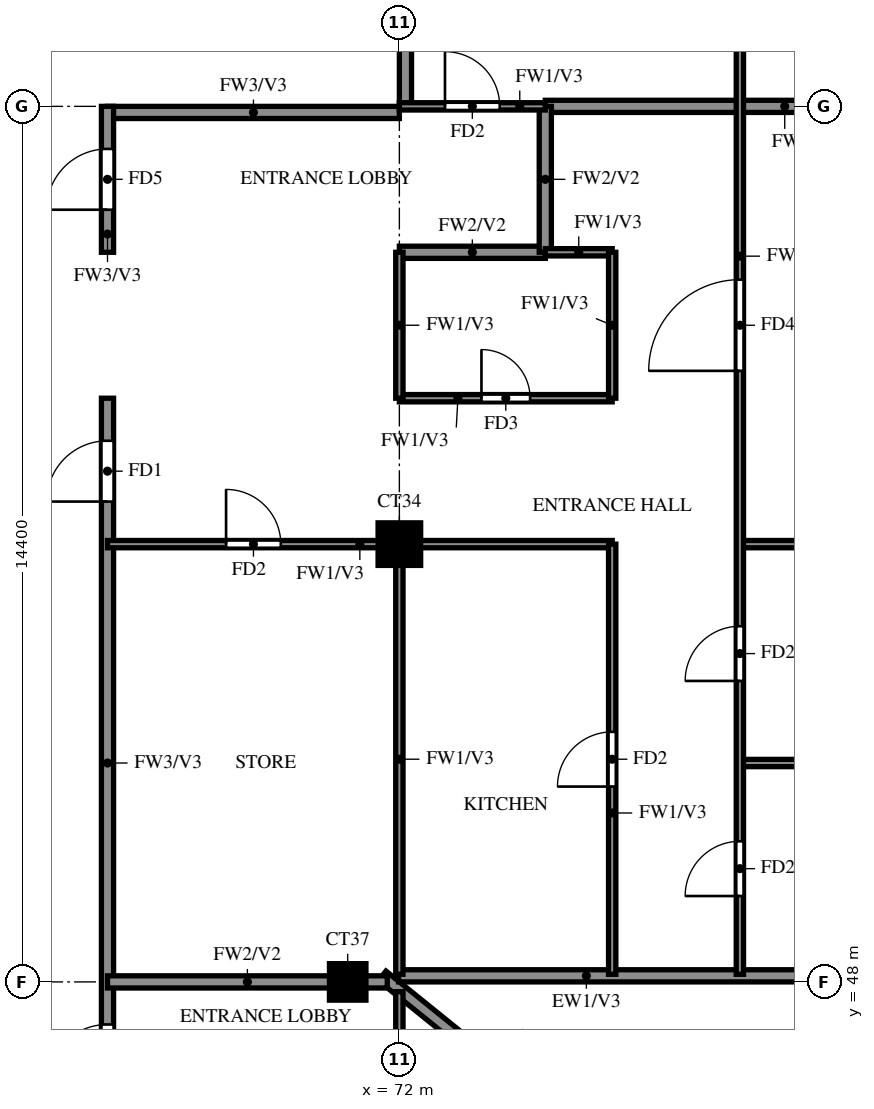
"""IFC4 building model, lengths in metres.
Left out: names, types, materials, properties, quantities, classifications, styles, units other than length and angle.
Written with IfcOpenShell. Run it as: python <this file> out.ifc"""

import sys

from ifc_helpers import new_model, si_unit, direction, frame, frame_2d, origin, origin_2d, place, context, subcontext, project, spatial, rectangle, extrude, source, transform, mapped, element, fill, save


model = new_model("IFC4")
c1 = context("Model", 3, precision=1e-05, world=origin(), true_north=direction((0.0, 1.0)))
c2 = subcontext(c1, "Body", "Model", "MODEL_VIEW")
j1 = project(units=[si_unit("LENGTHUNIT", "METRE"), si_unit("PLANEANGLEUNIT", "RADIAN")], contexts=[c1])
p1 = place(None, origin())
s1 = spatial("IfcSite", under=j1, at=p1, CompositionType="ELEMENT")
p2 = place(p1, origin())
s2 = spatial("IfcBuilding", under=s1, at=p2, CompositionType="ELEMENT")
p3 = place(p2, frame((0.0, 0.0, 257.0)))
s3 = spatial("IfcBuildingStorey", under=s2, at=p3, CompositionType="ELEMENT", Elevation=257.0)
m1 = source(origin(), c2, "Body", "SweptSolid", [
    extrude(rectangle(XDim=0.6, YDim=0.6, at=origin_2d()), origin(), (0.0, 0.0, 1.0), 3.22),
])
p4 = place(p3, frame((71.15, 48.0, 0.0), z_axis=(0.0, 0.0, 1.0), x_axis=(1.0, 0.0, 0.0)))
e1 = element("IfcColumn", 1, at=p4, inside=s3, PredefinedType="COLUMN", context=c2, shape_type="MappedRepresentation", body=[
    mapped(m1, transform((0.0, 0.0, 0.0))),
])
m2 = source(origin(), c2, "Body", "SweptSolid", [
    extrude(rectangle(XDim=0.7, YDim=0.7, at=origin_2d()), origin(), (0.0, 0.0, 1.0), 3.22),
])
p5 = place(p3, frame((72.0, 55.2, 0.0), z_axis=(0.0, 0.0, 1.0), x_axis=(1.0, 0.0, 0.0)))
e2 = element("IfcColumn", 2, at=p5, inside=s3, PredefinedType="COLUMN", context=c2, shape_type="MappedRepresentation", body=[
    mapped(m2, transform((0.0, 0.0, 0.0))),
])
p6 = place(p3, frame((81.907, 39.87, 0.0), z_axis=(0.0, 0.0, 1.0), x_axis=(-0.777936274417, 0.62834318087, 0.0)))
e3 = element("IfcWall", 3, at=p6, inside=s3, PredefinedType="SOLIDWALL", context=c2, shape_type="SweptSolid", body=[
    extrude(rectangle(XDim=13.099, YDim=0.2, at=frame_2d((6.549, 0.0))), origin(), (0.0, 0.0, 1.0), 3.22),
])
p7 = place(p6, frame((9.938, 0.0, 1.5)))
e4 = element("IfcOpeningElement", 4, at=p7, cuts=e3, PredefinedType="OPENING", context=c2, shape_type="SweptSolid", body=[
    extrude(rectangle(XDim=0.9, YDim=0.9, at=frame_2d((0.45, 0.45))), frame((0.0, 0.11, 0.0), z_axis=(0.0, -1.0, 0.0), x_axis=(1.0, 0.0, 0.0)), (0.0, 0.0, 1.0), 0.22),
])
p8 = place(p3, frame((71.987, 48.1, 0.0), z_axis=(0.0, 0.0, 1.0), x_axis=(1.0, 0.0, 0.0)))
e5 = element("IfcWall", 5, at=p8, inside=s3, PredefinedType="SOLIDWALL", context=c2, shape_type="SweptSolid", body=[
    extrude(rectangle(XDim=6.863, YDim=0.2, at=frame_2d((3.432, 0.0))), origin(), (0.0, 0.0, 1.0), 3.22),
])
p9 = place(p3, frame((67.2, 62.3, 0.0), z_axis=(0.0, 0.0, 1.0), x_axis=(1.0, 0.0, 0.0)))
e6 = element("IfcWall", 6, at=p9, inside=s3, PredefinedType="SOLIDWALL", context=c2, shape_type="SweptSolid", body=[
    extrude(rectangle(XDim=4.8, YDim=0.2, at=frame_2d((2.4, 0.0))), origin(), (0.0, 0.0, 1.0), 3.22),
])
p10 = place(p3, frame((67.2, 45.6, 0.0), z_axis=(0.0, 0.0, 1.0), x_axis=(0.0, 1.0, 0.0)))
e7 = element("IfcWall", 7, at=p10, inside=s3, PredefinedType="SOLIDWALL", context=c2, shape_type="SweptSolid", body=[
    extrude(rectangle(XDim=12.0, YDim=0.2, at=frame_2d((6.0, 0.0))), origin(), (0.0, 0.0, 1.0), 3.22),
])
p11 = place(p10, frame((10.3, 0.0, 0.0)))
e8 = element("IfcOpeningElement", 8, at=p11, cuts=e7, PredefinedType="OPENING", context=c2, shape_type="SweptSolid", body=[
    extrude(rectangle(XDim=1.0, YDim=2.1, at=frame_2d((0.5, 1.05))), frame((0.0, 0.11, 0.0), z_axis=(0.0, -1.0, 0.0), x_axis=(1.0, 0.0, 0.0)), (0.0, 0.0, 1.0), 0.22),
])
p12 = place(p10, frame((0.7, 0.0, 0.0)))
e9 = element("IfcOpeningElement", 9, at=p12, cuts=e7, PredefinedType="OPENING", context=c2, shape_type="SweptSolid", body=[
    extrude(rectangle(XDim=1.0, YDim=2.1, at=frame_2d((0.5, 1.05))), frame((0.0, 0.11, 0.0), z_axis=(0.0, -1.0, 0.0), x_axis=(1.0, 0.0, 0.0)), (0.0, 0.0, 1.0), 0.22),
])
p13 = place(p3, frame((67.2, 60.0, 0.0), z_axis=(0.0, 0.0, 1.0), x_axis=(0.0, 1.0, 0.0)))
e10 = element("IfcWall", 10, at=p13, inside=s3, PredefinedType="SOLIDWALL", context=c2, shape_type="SweptSolid", body=[
    extrude(rectangle(XDim=2.4, YDim=0.2, at=frame_2d((1.2, 0.0))), origin(), (0.0, 0.0, 1.0), 3.22),
])
p14 = place(p13, frame((0.7, 0.0, 0.0)))
e11 = element("IfcOpeningElement", 11, at=p14, cuts=e10, PredefinedType="OPENING", context=c2, shape_type="SweptSolid", body=[
    extrude(rectangle(XDim=1.0, YDim=2.1, at=frame_2d((0.5, 1.05))), frame((0.0, 0.11, 0.0), z_axis=(0.0, -1.0, 0.0), x_axis=(1.0, 0.0, 0.0)), (0.0, 0.0, 1.0), 0.22),
])
p15 = place(p3, frame((72.1, 62.4, 0.0), z_axis=(0.0, 0.0, 1.0), x_axis=(0.0, 1.0, 0.0)))
e12 = element("IfcWall", 12, at=p15, inside=s3, PredefinedType="SOLIDWALL", context=c2, shape_type="SweptSolid", body=[
    extrude(rectangle(XDim=15.6, YDim=0.2, at=frame_2d((7.8, 0.0))), origin(), (0.0, 0.0, 1.0), 3.22),
])
p16 = place(p3, frame((67.2, 48.0, 0.0), z_axis=(0.0, 0.0, 1.0), x_axis=(1.0, 0.0, 0.0)))
e13 = element("IfcWall", 13, at=p16, inside=s3, PredefinedType="SOLIDWALL", context=c2, shape_type="SweptSolid", body=[
    extrude(rectangle(XDim=4.601, YDim=0.2, at=frame_2d((2.301, 0.0))), origin(), (0.0, 0.0, 1.0), 3.22),
])
p17 = place(p3, frame((72.0, 60.0, 0.0), z_axis=(0.0, 0.0, 1.0), x_axis=(1.0, 0.0, 0.0)))
e14 = element("IfcWall", 14, at=p17, inside=s3, PredefinedType="SOLIDWALL", context=c2, shape_type="SweptSolid", body=[
    extrude(rectangle(XDim=2.4, YDim=0.2, at=frame_2d((1.2, 0.0))), origin(), (0.0, 0.0, 1.0), 3.22),
])
p18 = place(p3, frame((74.4, 62.4, 0.0), z_axis=(0.0, 0.0, 1.0), x_axis=(1.0, 0.0, 0.0)))
e15 = element("IfcWall", 15, at=p18, inside=s3, PredefinedType="SOLIDWALL", context=c2, shape_type="SweptSolid", body=[
    extrude(rectangle(XDim=7.875, YDim=0.2, at=frame_2d((3.938, 0.0))), origin(), (0.0, 0.0, 1.0), 3.22),
])
p19 = place(p3, frame((74.4, 60.0, 0.0), z_axis=(0.0, 0.0, 1.0), x_axis=(0.0, 1.0, 0.0)))
e16 = element("IfcWall", 16, at=p19, inside=s3, PredefinedType="SOLIDWALL", context=c2, shape_type="SweptSolid", body=[
    extrude(rectangle(XDim=2.4, YDim=0.2, at=frame_2d((1.2, 0.0))), origin(), (0.0, 0.0, 1.0), 3.22),
])
p20 = place(p3, frame((77.6, 51.6, 0.0), z_axis=(0.0, 0.0, 1.0), x_axis=(1.0, 0.0, 0.0)))
e17 = element("IfcWall", 17, at=p20, inside=s3, PredefinedType="PARTITIONING", context=c2, shape_type="SweptSolid", body=[
    extrude(rectangle(XDim=4.675, YDim=0.12, at=frame_2d((2.337, 0.0))), origin(), (0.0, 0.0, 1.0), 2.32),
])
p21 = place(p3, frame((67.2, 55.2, 0.0), z_axis=(0.0, 0.0, 1.0), x_axis=(1.0, 0.0, 0.0)))
e18 = element("IfcWall", 18, at=p21, inside=s3, PredefinedType="PARTITIONING", context=c2, shape_type="SweptSolid", body=[
    extrude(rectangle(XDim=8.3, YDim=0.12, at=frame_2d((4.15, 0.0))), origin(), (0.0, 0.0, 1.0), 3.22),
])
p22 = place(p21, frame((1.95, 0.0, 0.0)))
e19 = element("IfcOpeningElement", 19, at=p22, cuts=e18, PredefinedType="OPENING", context=c2, shape_type="SweptSolid", body=[
    extrude(rectangle(XDim=0.9, YDim=2.1, at=frame_2d((0.45, 1.05))), frame((0.0, 0.07, 0.0), z_axis=(0.0, -1.0, 0.0), x_axis=(1.0, 0.0, 0.0)), (0.0, 0.0, 1.0), 0.14),
])
p23 = place(p3, frame((77.6, 55.2, 0.0), z_axis=(0.0, 0.0, 1.0), x_axis=(1.0, 0.0, 0.0)))
e20 = element("IfcWall", 20, at=p23, inside=s3, PredefinedType="PARTITIONING", context=c2, shape_type="SweptSolid", body=[
    extrude(rectangle(XDim=4.675, YDim=0.12, at=frame_2d((2.337, 0.0))), origin(), (0.0, 0.0, 1.0), 3.22),
])
p24 = place(p3, frame((72.0, 57.6, 0.0), z_axis=(0.0, 0.0, 1.0), x_axis=(1.0, 0.0, 0.0)))
e21 = element("IfcWall", 21, at=p24, inside=s3, PredefinedType="PARTITIONING", context=c2, shape_type="SweptSolid", body=[
    extrude(rectangle(XDim=3.5, YDim=0.12, at=frame_2d((1.75, 0.0))), origin(), (0.0, 0.0, 1.0), 3.22),
])
p25 = place(p24, frame((1.35, 0.0, 0.0)))
e22 = element("IfcOpeningElement", 22, at=p25, cuts=e21, PredefinedType="OPENING", context=c2, shape_type="SweptSolid", body=[
    extrude(rectangle(XDim=0.8, YDim=2.1, at=frame_2d((0.4, 1.05))), frame((0.0, 0.07, 0.0), z_axis=(0.0, -1.0, 0.0), x_axis=(1.0, 0.0, 0.0)), (0.0, 0.0, 1.0), 0.14),
])
p26 = place(p3, frame((74.4, 60.0, 0.0), z_axis=(0.0, 0.0, 1.0), x_axis=(1.0, 0.0, 0.0)))
e23 = element("IfcWall", 23, at=p26, inside=s3, PredefinedType="PARTITIONING", context=c2, shape_type="SweptSolid", body=[
    extrude(rectangle(XDim=1.1, YDim=0.12, at=frame_2d((0.55, 0.0))), origin(), (0.0, 0.0, 1.0), 3.22),
])
p27 = place(p3, frame((72.0, 62.4, 0.0), z_axis=(0.0, 0.0, 1.0), x_axis=(1.0, 0.0, 0.0)))
e24 = element("IfcWall", 24, at=p27, inside=s3, PredefinedType="PARTITIONING", context=c2, shape_type="SweptSolid", body=[
    extrude(rectangle(XDim=2.4, YDim=0.12, at=frame_2d((1.2, 0.0))), origin(), (0.0, 0.0, 1.0), 3.22),
])
p28 = place(p27, frame((0.75, 0.0, 0.0)))
e25 = element("IfcOpeningElement", 25, at=p28, cuts=e24, PredefinedType="OPENING", context=c2, shape_type="SweptSolid", body=[
    extrude(rectangle(XDim=0.9, YDim=2.1, at=frame_2d((0.45, 1.05))), frame((0.0, 0.07, 0.0), z_axis=(0.0, -1.0, 0.0), x_axis=(1.0, 0.0, 0.0)), (0.0, 0.0, 1.0), 0.14),
])
p29 = place(p3, frame((72.0, 39.725, 0.0), z_axis=(0.0, 0.0, 1.0), x_axis=(0.0, 1.0, 0.0)))
e26 = element("IfcWall", 26, at=p29, inside=s3, PredefinedType="PARTITIONING", context=c2, shape_type="SweptSolid", body=[
    extrude(rectangle(XDim=8.114, YDim=0.12, at=frame_2d((4.057, 0.0))), origin(), (0.0, 0.0, 1.0), 2.32),
])
p30 = place(p29, frame((1.788, 0.0, 0.0)))
e27 = element("IfcOpeningElement", 27, at=p30, cuts=e26, PredefinedType="OPENING", context=c2, shape_type="SweptSolid", body=[
    extrude(rectangle(XDim=0.9, YDim=2.1, at=frame_2d((0.45, 1.05))), frame((0.0, 0.07, 0.0), z_axis=(0.0, -1.0, 0.0), x_axis=(1.0, 0.0, 0.0)), (0.0, 0.0, 1.0), 0.14),
])
p31 = place(p29, frame((4.575, 0.0, 0.0)))
e28 = element("IfcOpeningElement", 28, at=p31, cuts=e26, PredefinedType="OPENING", context=c2, shape_type="SweptSolid", body=[
    extrude(rectangle(XDim=0.8, YDim=2.1, at=frame_2d((0.4, 1.05))), frame((0.0, 0.07, 0.0), z_axis=(0.0, -1.0, 0.0), x_axis=(1.0, 0.0, 0.0)), (0.0, 0.0, 1.0), 0.14),
])
p32 = place(p3, frame((72.0, 48.125, 0.0), z_axis=(0.0, 0.0, 1.0), x_axis=(0.0, 1.0, 0.0)))
e29 = element("IfcWall", 29, at=p32, inside=s3, PredefinedType="PARTITIONING", context=c2, shape_type="SweptSolid", body=[
    extrude(rectangle(XDim=7.075, YDim=0.12, at=frame_2d((3.538, 0.0))), origin(), (0.0, 0.0, 1.0), 3.22),
])
p33 = place(p3, frame((72.0, 57.6, 0.0), z_axis=(0.0, 0.0, 1.0), x_axis=(0.0, 1.0, 0.0)))
e30 = element("IfcWall", 30, at=p33, inside=s3, PredefinedType="PARTITIONING", context=c2, shape_type="SweptSolid", body=[
    extrude(rectangle(XDim=2.4, YDim=0.12, at=frame_2d((1.2, 0.0))), origin(), (0.0, 0.0, 1.0), 3.22),
])
p34 = place(p3, frame((75.5, 48.125, 0.0), z_axis=(0.0, 0.0, 1.0), x_axis=(0.0, 1.0, 0.0)))
e31 = element("IfcWall", 31, at=p34, inside=s3, PredefinedType="PARTITIONING", context=c2, shape_type="SweptSolid", body=[
    extrude(rectangle(XDim=7.075, YDim=0.12, at=frame_2d((3.538, 0.0))), origin(), (0.0, 0.0, 1.0), 3.22),
])
p35 = place(p34, frame((3.087, 0.0, 0.0)))
e32 = element("IfcOpeningElement", 32, at=p35, cuts=e31, PredefinedType="OPENING", context=c2, shape_type="SweptSolid", body=[
    extrude(rectangle(XDim=0.9, YDim=2.1, at=frame_2d((0.45, 1.05))), frame((0.0, 0.07, 0.0), z_axis=(0.0, -1.0, 0.0), x_axis=(1.0, 0.0, 0.0)), (0.0, 0.0, 1.0), 0.14),
])
p36 = place(p3, frame((75.5, 57.6, 0.0), z_axis=(0.0, 0.0, 1.0), x_axis=(0.0, 1.0, 0.0)))
e33 = element("IfcWall", 33, at=p36, inside=s3, PredefinedType="PARTITIONING", context=c2, shape_type="SweptSolid", body=[
    extrude(rectangle(XDim=2.4, YDim=0.12, at=frame_2d((1.2, 0.0))), origin(), (0.0, 0.0, 1.0), 3.22),
])
p37 = place(p3, frame((77.6, 48.125, 0.0), z_axis=(0.0, 0.0, 1.0), x_axis=(0.0, 1.0, 0.0)))
e34 = element("IfcWall", 34, at=p37, inside=s3, PredefinedType="PARTITIONING", context=c2, shape_type="SweptSolid", body=[
    extrude(rectangle(XDim=21.475, YDim=0.12, at=frame_2d((10.738, 0.0))), origin(), (0.0, 0.0, 1.0), 3.22),
])
p38 = place(p37, frame((1.288, 0.0, 0.0)))
e35 = element("IfcOpeningElement", 35, at=p38, cuts=e34, PredefinedType="OPENING", context=c2, shape_type="SweptSolid", body=[
    extrude(rectangle(XDim=0.9, YDim=2.1, at=frame_2d((0.45, 1.05))), frame((0.0, 0.07, 0.0), z_axis=(0.0, -1.0, 0.0), x_axis=(1.0, 0.0, 0.0)), (0.0, 0.0, 1.0), 0.14),
])
p39 = place(p37, frame((4.825, 0.0, 0.0)))
e36 = element("IfcOpeningElement", 36, at=p39, cuts=e34, PredefinedType="OPENING", context=c2, shape_type="SweptSolid", body=[
    extrude(rectangle(XDim=0.9, YDim=2.1, at=frame_2d((0.45, 1.05))), frame((0.0, 0.07, 0.0), z_axis=(0.0, -1.0, 0.0), x_axis=(1.0, 0.0, 0.0)), (0.0, 0.0, 1.0), 0.14),
])
p40 = place(p37, frame((9.925, 0.0, 0.0)))
e37 = element("IfcOpeningElement", 37, at=p40, cuts=e34, PredefinedType="OPENING", context=c2, shape_type="SweptSolid", body=[
    extrude(rectangle(XDim=1.5, YDim=2.1, at=frame_2d((0.75, 1.05))), frame((0.0, 0.07, 0.0), z_axis=(0.0, -1.0, 0.0), x_axis=(1.0, 0.0, 0.0)), (0.0, 0.0, 1.0), 0.14),
])
p41 = place(p37, frame((15.625, 0.0, 0.0)))
e38 = element("IfcOpeningElement", 38, at=p41, cuts=e34, PredefinedType="OPENING", context=c2, shape_type="SweptSolid", body=[
    extrude(rectangle(XDim=0.9, YDim=2.1, at=frame_2d((0.45, 1.05))), frame((0.0, 0.07, 0.0), z_axis=(0.0, -1.0, 0.0), x_axis=(1.0, 0.0, 0.0)), (0.0, 0.0, 1.0), 0.14),
])
p42 = place(p37, frame((19.225, 0.0, 0.0)))
e39 = element("IfcOpeningElement", 39, at=p42, cuts=e34, PredefinedType="OPENING", context=c2, shape_type="SweptSolid", body=[
    extrude(rectangle(XDim=0.9, YDim=2.1, at=frame_2d((0.45, 1.05))), frame((0.0, 0.07, 0.0), z_axis=(0.0, -1.0, 0.0), x_axis=(1.0, 0.0, 0.0)), (0.0, 0.0, 1.0), 0.14),
])
p43 = place(p11, origin())
e40 = element("IfcDoor", 40, at=p43, inside=s3, OperationType="SINGLE_SWING_RIGHT", PredefinedType="DOOR", context=c2, shape_type="SweptSolid", body=[
    extrude(rectangle(XDim=1.0, YDim=2.1, at=frame_2d((0.5, 1.05))), frame((0.0, 0.025, 0.0), z_axis=(0.0, -1.0, 0.0), x_axis=(1.0, 0.0, 0.0)), (0.0, 0.0, 1.0), 0.05),
])
fill(e8, e40)
p44 = place(p38, origin())
e41 = element("IfcDoor", 41, at=p44, inside=s3, OperationType="SINGLE_SWING_LEFT", PredefinedType="DOOR", context=c2, shape_type="SweptSolid", body=[
    extrude(rectangle(XDim=0.9, YDim=2.1, at=frame_2d((0.45, 1.05))), frame((0.0, 0.025, 0.0), z_axis=(0.0, -1.0, 0.0), x_axis=(1.0, 0.0, 0.0)), (0.0, 0.0, 1.0), 0.05),
])
fill(e35, e41)
p45 = place(p39, origin())
e42 = element("IfcDoor", 42, at=p45, inside=s3, OperationType="SINGLE_SWING_LEFT", PredefinedType="DOOR", context=c2, shape_type="SweptSolid", body=[
    extrude(rectangle(XDim=0.9, YDim=2.1, at=frame_2d((0.45, 1.05))), frame((0.0, 0.025, 0.0), z_axis=(0.0, -1.0, 0.0), x_axis=(1.0, 0.0, 0.0)), (0.0, 0.0, 1.0), 0.05),
])
fill(e36, e42)
p46 = place(p40, origin())
e43 = element("IfcDoor", 43, at=p46, inside=s3, OperationType="SINGLE_SWING_RIGHT", PredefinedType="DOOR", context=c2, shape_type="SweptSolid", body=[
    extrude(rectangle(XDim=1.5, YDim=2.1, at=frame_2d((0.75, 1.05))), frame((0.0, 0.025, 0.0), z_axis=(0.0, -1.0, 0.0), x_axis=(1.0, 0.0, 0.0)), (0.0, 0.0, 1.0), 0.05),
])
fill(e37, e43)
p47 = place(p35, origin())
e44 = element("IfcDoor", 44, at=p47, inside=s3, OperationType="SINGLE_SWING_LEFT", PredefinedType="DOOR", context=c2, shape_type="SweptSolid", body=[
    extrude(rectangle(XDim=0.9, YDim=2.1, at=frame_2d((0.45, 1.05))), frame((0.0, 0.025, 0.0), z_axis=(0.0, -1.0, 0.0), x_axis=(1.0, 0.0, 0.0)), (0.0, 0.0, 1.0), 0.05),
])
fill(e32, e44)
p48 = place(p25, origin())
e45 = element("IfcDoor", 45, at=p48, inside=s3, OperationType="SINGLE_SWING_LEFT", PredefinedType="DOOR", context=c2, shape_type="SweptSolid", body=[
    extrude(rectangle(XDim=0.8, YDim=2.1, at=frame_2d((0.4, 1.05))), frame((0.0, 0.025, 0.0), z_axis=(0.0, -1.0, 0.0), x_axis=(1.0, 0.0, 0.0)), (0.0, 0.0, 1.0), 0.05),
])
fill(e22, e45)
p49 = place(p22, origin())
e46 = element("IfcDoor", 46, at=p49, inside=s3, OperationType="SINGLE_SWING_RIGHT", PredefinedType="DOOR", context=c2, shape_type="SweptSolid", body=[
    extrude(rectangle(XDim=0.9, YDim=2.1, at=frame_2d((0.45, 1.05))), frame((0.0, 0.025, 0.0), z_axis=(0.0, -1.0, 0.0), x_axis=(1.0, 0.0, 0.0)), (0.0, 0.0, 1.0), 0.05),
])
fill(e19, e46)
p50 = place(p28, origin())
e47 = element("IfcDoor", 47, at=p50, inside=s3, OperationType="SINGLE_SWING_LEFT", PredefinedType="DOOR", context=c2, shape_type="SweptSolid", body=[
    extrude(rectangle(XDim=0.9, YDim=2.1, at=frame_2d((0.45, 1.05))), frame((0.0, 0.025, 0.0), z_axis=(0.0, -1.0, 0.0), x_axis=(1.0, 0.0, 0.0)), (0.0, 0.0, 1.0), 0.05),
])
fill(e25, e47)
p51 = place(p14, origin())
e48 = element("IfcDoor", 48, at=p51, inside=s3, OperationType="SINGLE_SWING_LEFT", PredefinedType="DOOR", context=c2, shape_type="SweptSolid", body=[
    extrude(rectangle(XDim=1.0, YDim=2.1, at=frame_2d((0.5, 1.05))), frame((0.0, 0.025, 0.0), z_axis=(0.0, -1.0, 0.0), x_axis=(1.0, 0.0, 0.0)), (0.0, 0.0, 1.0), 0.05),
])
fill(e11, e48)
p52 = place(p12, origin())
e49 = element("IfcDoor", 49, at=p52, inside=s3, OperationType="SINGLE_SWING_LEFT", PredefinedType="DOOR", context=c2, shape_type="SweptSolid", body=[
    extrude(rectangle(XDim=1.0, YDim=2.1, at=frame_2d((0.5, 1.05))), frame((0.0, 0.025, 0.0), z_axis=(0.0, -1.0, 0.0), x_axis=(1.0, 0.0, 0.0)), (0.0, 0.0, 1.0), 0.05),
])
fill(e9, e49)
save(model, sys.argv[1])
